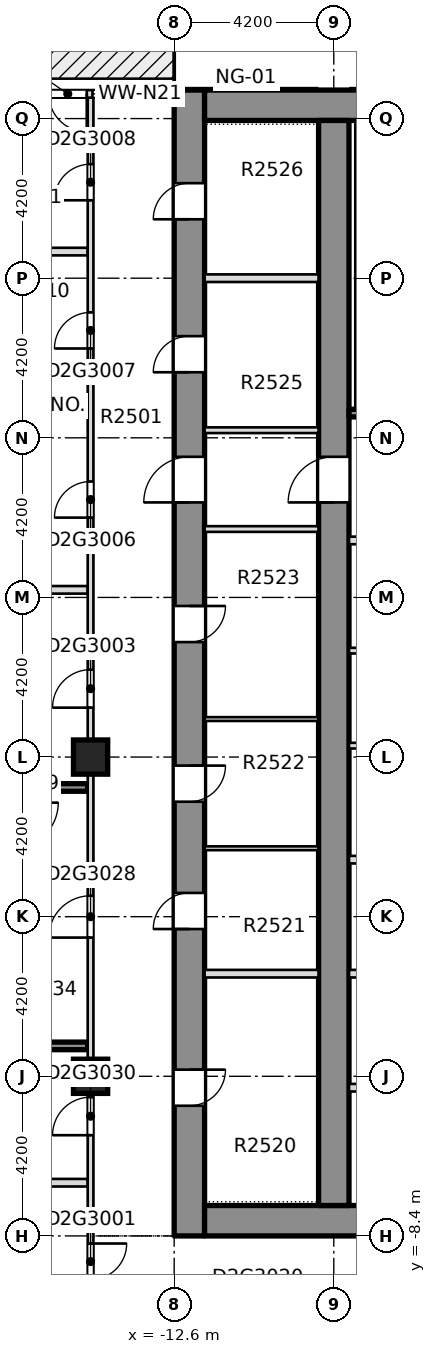
"""IFC4 building model, lengths in metres.
Left out: names, types, materials, properties, quantities, classifications, styles, units other than length and angle.
Written with IfcOpenShell. Run it as: python <this file> out.ifc"""

import sys

from ifc_helpers import new_model, si_unit, direction, frame, frame_2d, origin, origin_2d, place, context, subcontext, project, spatial, rectangle, extrude, element, fill, save


model = new_model("IFC4")
c1 = context("Model", 3, precision=1e-05, world=origin(), true_north=direction((0.0, 1.0)))
c2 = subcontext(c1, "Body", "Model", "MODEL_VIEW")
j1 = project(units=[si_unit("LENGTHUNIT", "METRE"), si_unit("PLANEANGLEUNIT", "RADIAN")], contexts=[c1])
p1 = place(None, origin())
s1 = spatial("IfcSite", under=j1, at=p1, CompositionType="ELEMENT")
p2 = place(p1, origin())
s2 = spatial("IfcBuilding", under=s1, at=p2, CompositionType="ELEMENT")
p3 = place(p2, frame((0.0, 0.0, 101.1)))
s3 = spatial("IfcBuildingStorey", under=s2, at=p3, CompositionType="ELEMENT", Elevation=101.1)
p4 = place(p3, frame((-12.2, -8.4, -0.32), z_axis=(0.0, 0.0, 1.0), x_axis=(0.0, 1.0, 0.0)))
e1 = element("IfcWall", 1, at=p4, inside=s3, PredefinedType="SHEAR", context=c2, shape_type="SweptSolid", body=[
    extrude(rectangle(XDim=30.15, YDim=0.8, at=frame_2d((15.075, 0.0))), origin(), (0.0, 0.0, 1.0), 3.45),
])
p5 = place(p4, frame((3.425, 0.0, 0.32)))
e2 = element("IfcOpeningElement", 2, at=p5, cuts=e1, PredefinedType="OPENING", context=c2, shape_type="SweptSolid", body=[
    extrude(rectangle(XDim=0.95, YDim=2.1, at=frame_2d((0.475, 1.05))), frame((0.0, 0.41, 0.0), z_axis=(0.0, -1.0, 0.0), x_axis=(1.0, 0.0, 0.0)), (0.0, 0.0, 1.0), 0.82),
])
p6 = place(p4, frame((8.075, 0.0, 0.32)))
e3 = element("IfcOpeningElement", 3, at=p6, cuts=e1, PredefinedType="OPENING", context=c2, shape_type="SweptSolid", body=[
    extrude(rectangle(XDim=0.95, YDim=2.1, at=frame_2d((0.475, 1.05))), frame((0.0, 0.41, 0.0), z_axis=(0.0, -1.0, 0.0), x_axis=(1.0, 0.0, 0.0)), (0.0, 0.0, 1.0), 0.82),
])
p7 = place(p4, frame((11.425, 0.0, 0.32)))
e4 = element("IfcOpeningElement", 4, at=p7, cuts=e1, PredefinedType="OPENING", context=c2, shape_type="SweptSolid", body=[
    extrude(rectangle(XDim=0.95, YDim=2.1, at=frame_2d((0.475, 1.05))), frame((0.0, 0.41, 0.0), z_axis=(0.0, -1.0, 0.0), x_axis=(1.0, 0.0, 0.0)), (0.0, 0.0, 1.0), 0.82),
])
p8 = place(p4, frame((15.625, 0.0, 0.32)))
e5 = element("IfcOpeningElement", 5, at=p8, cuts=e1, PredefinedType="OPENING", context=c2, shape_type="SweptSolid", body=[
    extrude(rectangle(XDim=0.95, YDim=2.1, at=frame_2d((0.475, 1.05))), frame((0.0, 0.41, 0.0), z_axis=(0.0, -1.0, 0.0), x_axis=(1.0, 0.0, 0.0)), (0.0, 0.0, 1.0), 0.82),
])
p9 = place(p4, frame((22.725, 0.0, 0.32)))
e6 = element("IfcOpeningElement", 6, at=p9, cuts=e1, PredefinedType="OPENING", context=c2, shape_type="SweptSolid", body=[
    extrude(rectangle(XDim=0.95, YDim=2.1, at=frame_2d((0.475, 1.05))), frame((0.0, 0.41, 0.0), z_axis=(0.0, -1.0, 0.0), x_axis=(1.0, 0.0, 0.0)), (0.0, 0.0, 1.0), 0.82),
])
p10 = place(p4, frame((26.75, 0.0, 0.32)))
e7 = element("IfcOpeningElement", 7, at=p10, cuts=e1, PredefinedType="OPENING", context=c2, shape_type="SweptSolid", body=[
    extrude(rectangle(XDim=0.95, YDim=2.1, at=frame_2d((0.475, 1.05))), frame((0.0, 0.41, 0.0), z_axis=(0.0, -1.0, 0.0), x_axis=(1.0, 0.0, 0.0)), (0.0, 0.0, 1.0), 0.82),
])
p11 = place(p4, frame((19.3, 0.0, 0.32)))
e8 = element("IfcOpeningElement", 8, at=p11, cuts=e1, PredefinedType="OPENING", context=c2, shape_type="SweptSolid", body=[
    extrude(rectangle(XDim=1.2, YDim=2.1, at=frame_2d((0.6, 1.05))), frame((0.0, 0.41, 0.0), z_axis=(0.0, -1.0, 0.0), x_axis=(1.0, 0.0, 0.0)), (0.0, 0.0, 1.0), 0.82),
])
p12 = place(p3, frame((-11.8, -8.0, -0.32), z_axis=(0.0, 0.0, 1.0), x_axis=(1.0, 0.0, 0.0)))
e9 = element("IfcWall", 9, at=p12, inside=s3, PredefinedType="SHEAR", context=c2, shape_type="SweptSolid", body=[
    extrude(rectangle(XDim=23.6, YDim=0.8, at=frame_2d((11.8, 0.0))), origin(), (0.0, 0.0, 1.0), 3.45),
])
p13 = place(p12, frame((7.05, 0.0, 0.32)))
e10 = element("IfcOpeningElement", 10, at=p13, cuts=e9, PredefinedType="OPENING", context=c2, shape_type="SweptSolid", body=[
    extrude(rectangle(XDim=1.8, YDim=2.1, at=frame_2d((0.9, 1.05))), frame((0.0, 0.41, 0.0), z_axis=(0.0, -1.0, 0.0), x_axis=(1.0, 0.0, 0.0)), (0.0, 0.0, 1.0), 0.82),
])
p14 = place(p12, frame((14.75, 0.0, 0.32)))
e11 = element("IfcOpeningElement", 11, at=p14, cuts=e9, PredefinedType="OPENING", context=c2, shape_type="SweptSolid", body=[
    extrude(rectangle(XDim=1.8, YDim=2.1, at=frame_2d((0.9, 1.05))), frame((0.0, 0.41, 0.0), z_axis=(0.0, -1.0, 0.0), x_axis=(1.0, 0.0, 0.0)), (0.0, 0.0, 1.0), 0.82),
])
p15 = place(p3, frame((-11.8, 21.35, -0.32), z_axis=(0.0, 0.0, 1.0), x_axis=(1.0, 0.0, 0.0)))
e12 = element("IfcWall", 12, at=p15, inside=s3, PredefinedType="SHEAR", context=c2, shape_type="SweptSolid", body=[
    extrude(rectangle(XDim=23.6, YDim=0.8, at=frame_2d((11.8, 0.0))), origin(), (0.0, 0.0, 1.0), 3.45),
])
p16 = place(p3, frame((-8.4, -7.6, -0.32), z_axis=(0.0, 0.0, 1.0), x_axis=(0.0, 1.0, 0.0)))
e13 = element("IfcWall", 13, at=p16, inside=s3, PredefinedType="SHEAR", context=c2, shape_type="SweptSolid", body=[
    extrude(rectangle(XDim=28.55, YDim=0.8, at=frame_2d((14.275, 0.0))), origin(), (0.0, 0.0, 1.0), 3.45),
])
p17 = place(p16, frame((18.5, 0.0, 0.32)))
e14 = element("IfcOpeningElement", 14, at=p17, cuts=e13, PredefinedType="OPENING", context=c2, shape_type="SweptSolid", body=[
    extrude(rectangle(XDim=1.2, YDim=2.1, at=frame_2d((0.6, 1.05))), frame((0.0, 0.41, 0.0), z_axis=(0.0, -1.0, 0.0), x_axis=(1.0, 0.0, 0.0)), (0.0, 0.0, 1.0), 0.82),
])
for number, where, z_axis, x_axis in (
    (15, (-14.8, -4.2, -0.32), (0.0, 0.0, 1.0), (1.0, 0.0, 0.0)),
    (16, (-14.8, 4.2, -0.32), (0.0, 0.0, 1.0), (1.0, 0.0, 0.0)),
):
    element("IfcColumn", number, at=place(p3, frame(where, z_axis=z_axis, x_axis=x_axis)), inside=s3, PredefinedType="COLUMN", context=c2, shape_type="SweptSolid", body=[
        extrude(rectangle(XDim=0.9, YDim=0.9, at=origin_2d()), origin(), (0.0, 0.0, 1.0), 3.45),
    ])
p18 = place(p3, frame((-25.75, -7.0, 0.0), z_axis=(0.0, 0.0, 1.0), x_axis=(1.0, 0.0, 0.0)))
e17 = element("IfcWall", 17, at=p18, inside=s3, PredefinedType="PARTITIONING", context=c2, shape_type="SweptSolid", body=[
    extrude(rectangle(XDim=10.875, YDim=0.2, at=frame_2d((5.438, 0.0))), origin(), (0.0, 0.0, 1.0), 3.13),
])
p19 = place(p3, frame((-20.45, 3.4, 0.0), z_axis=(0.0, 0.0, 1.0), x_axis=(1.0, 0.0, 0.0)))
e18 = element("IfcWall", 18, at=p19, inside=s3, PredefinedType="SOLIDWALL", context=c2, shape_type="SweptSolid", body=[
    extrude(rectangle(XDim=5.575, YDim=0.2, at=frame_2d((2.788, 0.0))), origin(), (0.0, 0.0, 1.0), 3.13),
])
p20 = place(p3, frame((-25.75, 8.6, 0.0), z_axis=(0.0, 0.0, 1.0), x_axis=(1.0, 0.0, 0.0)))
e19 = element("IfcWall", 19, at=p20, inside=s3, PredefinedType="PARTITIONING", context=c2, shape_type="SweptSolid", body=[
    extrude(rectangle(XDim=10.875, YDim=0.2, at=frame_2d((5.438, 0.0))), origin(), (0.0, 0.0, 1.0), 3.13),
])
for number, where, z_axis, x_axis in (
    (20, (-17.35, 13.35, 0.0), (0.0, 0.0, 1.0), (1.0, 0.0, 0.0)),
    (21, (-17.35, 17.5, 0.0), (0.0, 0.0, 1.0), (1.0, 0.0, 0.0)),
):
    element("IfcWall", number, at=place(p3, frame(where, z_axis=z_axis, x_axis=x_axis)), inside=s3, PredefinedType="PARTITIONING", context=c2, shape_type="SweptSolid", body=[
        extrude(rectangle(XDim=2.475, YDim=0.2, at=frame_2d((1.238, 0.0))), origin(), (0.0, 0.0, 1.0), 3.13),
    ])
p21 = place(p3, frame((-14.8, -10.6, 0.0), z_axis=(0.0, 0.0, 1.0), x_axis=(0.0, 1.0, 0.0)))
e22 = element("IfcWall", 22, at=p21, inside=s3, PredefinedType="PARTITIONING", context=c2, shape_type="SweptSolid", body=[
    extrude(rectangle(XDim=32.15, YDim=0.15, at=frame_2d((16.075, 0.0))), origin(), (0.0, 0.0, 1.0), 3.13),
])
p22 = place(p21, frame((1.05, 0.0, 0.0)))
e23 = element("IfcOpeningElement", 23, at=p22, cuts=e22, PredefinedType="OPENING", context=c2, shape_type="SweptSolid", body=[
    extrude(rectangle(XDim=0.95, YDim=2.1, at=frame_2d((0.475, 1.05))), frame((0.0, 0.085, 0.0), z_axis=(0.0, -1.0, 0.0), x_axis=(1.0, 0.0, 0.0)), (0.0, 0.0, 1.0), 0.17),
])
p23 = place(p21, frame((16.1, 0.0, 0.0)))
e24 = element("IfcOpeningElement", 24, at=p23, cuts=e22, PredefinedType="OPENING", context=c2, shape_type="SweptSolid", body=[
    extrude(rectangle(XDim=1.0, YDim=2.1, at=frame_2d((0.5, 1.05))), frame((0.0, 0.085, 0.0), z_axis=(0.0, -1.0, 0.0), x_axis=(1.0, 0.0, 0.0)), (0.0, 0.0, 1.0), 0.17),
])
p24 = place(p21, frame((21.1, 0.0, 0.0)))
e25 = element("IfcOpeningElement", 25, at=p24, cuts=e22, PredefinedType="OPENING", context=c2, shape_type="SweptSolid", body=[
    extrude(rectangle(XDim=0.95, YDim=2.1, at=frame_2d((0.475, 1.05))), frame((0.0, 0.085, 0.0), z_axis=(0.0, -1.0, 0.0), x_axis=(1.0, 0.0, 0.0)), (0.0, 0.0, 1.0), 0.17),
])
p25 = place(p21, frame((25.55, 0.0, 0.0)))
e26 = element("IfcOpeningElement", 26, at=p25, cuts=e22, PredefinedType="OPENING", context=c2, shape_type="SweptSolid", body=[
    extrude(rectangle(XDim=0.95, YDim=2.1, at=frame_2d((0.475, 1.05))), frame((0.0, 0.085, 0.0), z_axis=(0.0, -1.0, 0.0), x_axis=(1.0, 0.0, 0.0)), (0.0, 0.0, 1.0), 0.17),
])
p26 = place(p21, frame((29.45, 0.0, 0.0)))
e27 = element("IfcOpeningElement", 27, at=p26, cuts=e22, PredefinedType="OPENING", context=c2, shape_type="SweptSolid", body=[
    extrude(rectangle(XDim=0.95, YDim=2.1, at=frame_2d((0.475, 1.05))), frame((0.0, 0.085, 0.0), z_axis=(0.0, -1.0, 0.0), x_axis=(1.0, 0.0, 0.0)), (0.0, 0.0, 1.0), 0.17),
])
p27 = place(p21, frame((10.05, 0.0, 0.0)))
e28 = element("IfcOpeningElement", 28, at=p27, cuts=e22, PredefinedType="OPENING", context=c2, shape_type="SweptSolid", body=[
    extrude(rectangle(XDim=1.1, YDim=2.1, at=frame_2d((0.55, 1.05))), frame((0.0, 0.085, 0.0), z_axis=(0.0, -1.0, 0.0), x_axis=(1.0, 0.0, 0.0)), (0.0, 0.0, 1.0), 0.17),
])
p28 = place(p21, frame((4.85, 0.0, 0.0)))
e29 = element("IfcOpeningElement", 29, at=p28, cuts=e22, PredefinedType="OPENING", context=c2, shape_type="SweptSolid", body=[
    extrude(rectangle(XDim=1.0, YDim=2.1, at=frame_2d((0.5, 1.05))), frame((0.0, 0.085, 0.0), z_axis=(0.0, -1.0, 0.0), x_axis=(1.0, 0.0, 0.0)), (0.0, 0.0, 1.0), 0.17),
])
p29 = place(p3, frame((-12.6, 21.65, 0.0), z_axis=(0.0, 0.0, 1.0), x_axis=(-1.0, 0.0, 0.0)))
e30 = element("IfcWall", 30, at=p29, inside=s3, PredefinedType="STANDARD", context=c2, shape_type="SweptSolid", body=[
    extrude(rectangle(XDim=3.6, YDim=0.2, at=frame_2d((1.8, 0.0))), origin(), (0.0, 0.0, 1.0), 3.13),
])
p30 = place(p29, frame((0.35, 0.0, 0.2)))
e31 = element("IfcOpeningElement", 31, at=p30, cuts=e30, PredefinedType="OPENING", context=c2, shape_type="SweptSolid", body=[
    extrude(rectangle(XDim=1.8, YDim=2.65, at=frame_2d((0.9, 1.325))), frame((0.0, 0.11, 0.0), z_axis=(0.0, -1.0, 0.0), x_axis=(1.0, 0.0, 0.0)), (0.0, 0.0, 1.0), 0.22),
])
p31 = place(p29, frame((2.3, 0.0, 0.0)))
e32 = element("IfcOpeningElement", 32, at=p31, cuts=e30, PredefinedType="OPENING", context=c2, shape_type="SweptSolid", body=[
    extrude(rectangle(XDim=1.0, YDim=2.4, at=frame_2d((0.5, 1.2))), frame((0.0, 0.11, 0.0), z_axis=(0.0, -1.0, 0.0), x_axis=(1.0, 0.0, 0.0)), (0.0, 0.0, 1.0), 0.22),
])
for number, where, z_axis, x_axis in (
    (33, (-7.999, -4.5, 0.0), (0.0, 0.0, 1.0), (1.0, 0.0, 0.0)),
    (34, (-7.999, -1.5, 0.0), (0.0, 0.0, 1.0), (1.0, 0.0, 0.0)),
    (35, (-7.999, 1.5, 0.0), (0.0, 0.0, 1.0), (1.0, 0.0, 0.0)),
):
    element("IfcWall", number, at=place(p3, frame(where, z_axis=z_axis, x_axis=x_axis)), inside=s3, PredefinedType="PARTITIONING", context=c2, shape_type="SweptSolid", body=[
        extrude(rectangle(XDim=2.424, YDim=0.2, at=frame_2d((1.212, 0.0))), origin(), (0.0, 0.0, 1.0), 3.13),
    ])
p32 = place(p3, frame((-7.999, 4.5, 0.0), z_axis=(0.0, 0.0, 1.0), x_axis=(1.0, 0.0, 0.0)))
e36 = element("IfcWall", 36, at=p32, inside=s3, PredefinedType="PARTITIONING", context=c2, shape_type="SweptSolid", body=[
    extrude(rectangle(XDim=2.574, YDim=0.15, at=frame_2d((1.287, 0.0))), origin(), (0.0, 0.0, 1.0), 3.13),
])
p33 = place(p3, frame((-7.999, 7.0, 0.0), z_axis=(0.0, 0.0, 1.0), x_axis=(1.0, 0.0, 0.0)))
e37 = element("IfcWall", 37, at=p33, inside=s3, PredefinedType="PARTITIONING", context=c2, shape_type="SweptSolid", body=[
    extrude(rectangle(XDim=15.998, YDim=0.15, at=frame_2d((7.999, 0.0))), origin(), (0.0, 0.0, 1.0), 3.13),
])
p34 = place(p33, frame((7.299, 0.0, 0.0)))
e38 = element("IfcOpeningElement", 38, at=p34, cuts=e37, PredefinedType="OPENING", context=c2, shape_type="SweptSolid", body=[
    extrude(rectangle(XDim=1.4, YDim=2.1, at=frame_2d((0.7, 1.05))), frame((0.0, 0.085, 0.0), z_axis=(0.0, -1.0, 0.0), x_axis=(1.0, 0.0, 0.0)), (0.0, 0.0, 1.0), 0.17),
])
p35 = place(p3, frame((-7.999, 9.9, 0.0), z_axis=(0.0, 0.0, 1.0), x_axis=(1.0, 0.0, 0.0)))
e39 = element("IfcWall", 39, at=p35, inside=s3, PredefinedType="PARTITIONING", context=c2, shape_type="SweptSolid", body=[
    extrude(rectangle(XDim=4.399, YDim=0.2, at=frame_2d((2.199, 0.0))), origin(), (0.0, 0.0, 1.0), 3.13),
])
p36 = place(p35, frame((1.049, 0.0, 0.0)))
e40 = element("IfcOpeningElement", 40, at=p36, cuts=e39, PredefinedType="OPENING", context=c2, shape_type="SweptSolid", body=[
    extrude(rectangle(XDim=1.1, YDim=2.1, at=frame_2d((0.55, 1.05))), frame((0.0, 0.11, 0.0), z_axis=(0.0, -1.0, 0.0), x_axis=(1.0, 0.0, 0.0)), (0.0, 0.0, 1.0), 0.22),
])
p37 = place(p3, frame((-7.999, 13.25, 0.0), z_axis=(0.0, 0.0, 1.0), x_axis=(1.0, 0.0, 0.0)))
e41 = element("IfcWall", 41, at=p37, inside=s3, PredefinedType="SOLIDWALL", context=c2, shape_type="SweptSolid", body=[
    extrude(rectangle(XDim=4.574, YDim=0.2, at=frame_2d((2.287, 0.0))), origin(), (0.0, 0.0, 1.0), 3.13),
])
p38 = place(p37, frame((1.549, 0.0, 0.0)))
e42 = element("IfcOpeningElement", 42, at=p38, cuts=e41, PredefinedType="OPENING", context=c2, shape_type="SweptSolid", body=[
    extrude(rectangle(XDim=1.2, YDim=2.1, at=frame_2d((0.6, 1.05))), frame((0.0, 0.11, 0.0), z_axis=(0.0, -1.0, 0.0), x_axis=(1.0, 0.0, 0.0)), (0.0, 0.0, 1.0), 0.22),
])
p39 = place(p3, frame((-11.799, -1.5, 0.0), z_axis=(0.0, 0.0, 1.0), x_axis=(1.0, 0.0, 0.0)))
e43 = element("IfcWall", 43, at=p39, inside=s3, PredefinedType="PARTITIONING", context=c2, shape_type="SweptSolid", body=[
    extrude(rectangle(XDim=2.998, YDim=0.2, at=frame_2d((1.499, 0.0))), origin(), (0.0, 0.0, 1.0), 3.13),
])
for number, where, z_axis, x_axis in (
    (44, (-11.799, 1.8, 0.0), (0.0, 0.0, 1.0), (1.0, 0.0, 0.0)),
    (45, (-11.799, 5.2, 0.0), (0.0, 0.0, 1.0), (1.0, 0.0, 0.0)),
):
    element("IfcWall", number, at=place(p3, frame(where, z_axis=z_axis, x_axis=x_axis)), inside=s3, PredefinedType="PARTITIONING", context=c2, shape_type="SweptSolid", body=[
        extrude(rectangle(XDim=2.998, YDim=0.1, at=frame_2d((1.499, 0.0))), origin(), (0.0, 0.0, 1.0), 3.13),
    ])
for number, where, z_axis, x_axis in (
    (46, (-11.799, 10.2, 0.0), (0.0, 0.0, 1.0), (1.0, 0.0, 0.0)),
    (47, (-11.799, 12.8, 0.0), (0.0, 0.0, 1.0), (1.0, 0.0, 0.0)),
):
    element("IfcWall", number, at=place(p3, frame(where, z_axis=z_axis, x_axis=x_axis)), inside=s3, PredefinedType="PARTITIONING", context=c2, shape_type="SweptSolid", body=[
        extrude(rectangle(XDim=2.998, YDim=0.15, at=frame_2d((1.499, 0.0))), origin(), (0.0, 0.0, 1.0), 3.13),
    ])
p40 = place(p3, frame((-11.799, 16.8, 0.0), z_axis=(0.0, 0.0, 1.0), x_axis=(1.0, 0.0, 0.0)))
e48 = element("IfcWall", 48, at=p40, inside=s3, PredefinedType="PARTITIONING", context=c2, shape_type="SweptSolid", body=[
    extrude(rectangle(XDim=2.998, YDim=0.2, at=frame_2d((1.499, 0.0))), origin(), (0.0, 0.0, 1.0), 3.13),
])
p41 = place(p3, frame((-23.0, -3.4, 0.0), z_axis=(0.0, 0.0, 1.0), x_axis=(1.0, 0.0, 0.0)))
e49 = element("IfcWall", 49, at=p41, inside=s3, PredefinedType="SOLIDWALL", context=c2, shape_type="SweptSolid", body=[
    extrude(rectangle(XDim=8.123, YDim=0.2, at=frame_2d((4.062, 0.0))), origin(), (0.0, 0.0, 1.0), 3.13),
])
p42 = place(p22, origin())
e50 = element("IfcDoor", 50, at=p42, inside=s3, OperationType="SINGLE_SWING_LEFT", PredefinedType="DOOR", context=c2, shape_type="SweptSolid", body=[
    extrude(rectangle(XDim=0.95, YDim=2.1, at=frame_2d((0.475, 1.05))), frame((0.0, 0.025, 0.0), z_axis=(0.0, -1.0, 0.0), x_axis=(1.0, 0.0, 0.0)), (0.0, 0.0, 1.0), 0.05),
])
fill(e23, e50)
p43 = place(p23, origin())
e51 = element("IfcDoor", 51, at=p43, inside=s3, OperationType="SINGLE_SWING_LEFT", PredefinedType="DOOR", context=c2, shape_type="SweptSolid", body=[
    extrude(rectangle(XDim=1.0, YDim=2.1, at=frame_2d((0.5, 1.05))), frame((0.0, 0.025, 0.0), z_axis=(0.0, -1.0, 0.0), x_axis=(1.0, 0.0, 0.0)), (0.0, 0.0, 1.0), 0.05),
])
fill(e24, e51)
p44 = place(p24, origin())
e52 = element("IfcDoor", 52, at=p44, inside=s3, OperationType="SINGLE_SWING_RIGHT", PredefinedType="DOOR", context=c2, shape_type="SweptSolid", body=[
    extrude(rectangle(XDim=0.95, YDim=2.1, at=frame_2d((0.475, 1.05))), frame((0.0, 0.025, 0.0), z_axis=(0.0, -1.0, 0.0), x_axis=(1.0, 0.0, 0.0)), (0.0, 0.0, 1.0), 0.05),
])
fill(e25, e52)
p45 = place(p25, origin())
e53 = element("IfcDoor", 53, at=p45, inside=s3, OperationType="SINGLE_SWING_LEFT", PredefinedType="DOOR", context=c2, shape_type="SweptSolid", body=[
    extrude(rectangle(XDim=0.95, YDim=2.1, at=frame_2d((0.475, 1.05))), frame((0.0, 0.025, 0.0), z_axis=(0.0, -1.0, 0.0), x_axis=(1.0, 0.0, 0.0)), (0.0, 0.0, 1.0), 0.05),
])
fill(e26, e53)
p46 = place(p26, origin())
e54 = element("IfcDoor", 54, at=p46, inside=s3, OperationType="SINGLE_SWING_RIGHT", PredefinedType="DOOR", context=c2, shape_type="SweptSolid", body=[
    extrude(rectangle(XDim=0.95, YDim=2.1, at=frame_2d((0.475, 1.05))), frame((0.0, 0.025, 0.0), z_axis=(0.0, -1.0, 0.0), x_axis=(1.0, 0.0, 0.0)), (0.0, 0.0, 1.0), 0.05),
])
fill(e27, e54)
p47 = place(p27, origin())
e55 = element("IfcDoor", 55, at=p47, inside=s3, OperationType="SINGLE_SWING_RIGHT", PredefinedType="DOOR", context=c2, shape_type="SweptSolid", body=[
    extrude(rectangle(XDim=1.1, YDim=2.1, at=frame_2d((0.55, 1.05))), frame((0.0, 0.025, 0.0), z_axis=(0.0, -1.0, 0.0), x_axis=(1.0, 0.0, 0.0)), (0.0, 0.0, 1.0), 0.05),
])
fill(e28, e55)
p48 = place(p28, origin())
e56 = element("IfcDoor", 56, at=p48, inside=s3, OperationType="SINGLE_SWING_RIGHT", PredefinedType="DOOR", context=c2, shape_type="SweptSolid", body=[
    extrude(rectangle(XDim=1.0, YDim=2.1, at=frame_2d((0.5, 1.05))), frame((0.0, 0.025, 0.0), z_axis=(0.0, -1.0, 0.0), x_axis=(1.0, 0.0, 0.0)), (0.0, 0.0, 1.0), 0.05),
])
fill(e29, e56)
p49 = place(p30, origin())
e57 = element("IfcWindow", 57, at=p49, inside=s3, PartitioningType="SINGLE_PANEL", PredefinedType="WINDOW", context=c2, shape_type="SweptSolid", body=[
    extrude(rectangle(XDim=1.8, YDim=2.65, at=frame_2d((0.9, 1.325))), frame((0.0, 0.03, 0.0), z_axis=(0.0, -1.0, 0.0), x_axis=(1.0, 0.0, 0.0)), (0.0, 0.0, 1.0), 0.06),
])
fill(e31, e57)
p50 = place(p31, origin())
e58 = element("IfcDoor", 58, at=p50, inside=s3, OperationType="SINGLE_SWING_LEFT", PredefinedType="DOOR", context=c2, shape_type="SweptSolid", body=[
    extrude(rectangle(XDim=1.0, YDim=2.4, at=frame_2d((0.5, 1.2))), frame((0.0, 0.025, 0.0), z_axis=(0.0, -1.0, 0.0), x_axis=(1.0, 0.0, 0.0)), (0.0, 0.0, 1.0), 0.05),
])
fill(e32, e58)
p51 = place(p5, origin())
e59 = element("IfcDoor", 59, at=p51, inside=s3, OperationType="SINGLE_SWING_LEFT", PredefinedType="DOOR", context=c2, shape_type="SweptSolid", body=[
    extrude(rectangle(XDim=0.95, YDim=2.1, at=frame_2d((0.475, 1.05))), frame((0.0, 0.025, 0.0), z_axis=(0.0, -1.0, 0.0), x_axis=(1.0, 0.0, 0.0)), (0.0, 0.0, 1.0), 0.05),
])
fill(e2, e59)
p52 = place(p6, origin())
e60 = element("IfcDoor", 60, at=p52, inside=s3, OperationType="SINGLE_SWING_LEFT", PredefinedType="DOOR", context=c2, shape_type="SweptSolid", body=[
    extrude(rectangle(XDim=0.95, YDim=2.1, at=frame_2d((0.475, 1.05))), frame((0.0, 0.025, 0.0), z_axis=(0.0, -1.0, 0.0), x_axis=(1.0, 0.0, 0.0)), (0.0, 0.0, 1.0), 0.05),
])
fill(e3, e60)
p53 = place(p7, origin())
e61 = element("IfcDoor", 61, at=p53, inside=s3, OperationType="SINGLE_SWING_LEFT", PredefinedType="DOOR", context=c2, shape_type="SweptSolid", body=[
    extrude(rectangle(XDim=0.95, YDim=2.1, at=frame_2d((0.475, 1.05))), frame((0.0, 0.025, 0.0), z_axis=(0.0, -1.0, 0.0), x_axis=(1.0, 0.0, 0.0)), (0.0, 0.0, 1.0), 0.05),
])
fill(e4, e61)
p54 = place(p8, origin())
e62 = element("IfcDoor", 62, at=p54, inside=s3, OperationType="SINGLE_SWING_LEFT", PredefinedType="DOOR", context=c2, shape_type="SweptSolid", body=[
    extrude(rectangle(XDim=0.95, YDim=2.1, at=frame_2d((0.475, 1.05))), frame((0.0, 0.025, 0.0), z_axis=(0.0, -1.0, 0.0), x_axis=(1.0, 0.0, 0.0)), (0.0, 0.0, 1.0), 0.05),
])
fill(e5, e62)
p55 = place(p9, origin())
e63 = element("IfcDoor", 63, at=p55, inside=s3, OperationType="SINGLE_SWING_LEFT", PredefinedType="DOOR", context=c2, shape_type="SweptSolid", body=[
    extrude(rectangle(XDim=0.95, YDim=2.1, at=frame_2d((0.475, 1.05))), frame((0.0, 0.025, 0.0), z_axis=(0.0, -1.0, 0.0), x_axis=(1.0, 0.0, 0.0)), (0.0, 0.0, 1.0), 0.05),
])
fill(e6, e63)
p56 = place(p10, origin())
e64 = element("IfcDoor", 64, at=p56, inside=s3, OperationType="SINGLE_SWING_LEFT", PredefinedType="DOOR", context=c2, shape_type="SweptSolid", body=[
    extrude(rectangle(XDim=0.95, YDim=2.1, at=frame_2d((0.475, 1.05))), frame((0.0, 0.025, 0.0), z_axis=(0.0, -1.0, 0.0), x_axis=(1.0, 0.0, 0.0)), (0.0, 0.0, 1.0), 0.05),
])
fill(e7, e64)
p57 = place(p11, origin())
e65 = element("IfcDoor", 65, at=p57, inside=s3, OperationType="SINGLE_SWING_LEFT", PredefinedType="DOOR", context=c2, shape_type="SweptSolid", body=[
    extrude(rectangle(XDim=1.2, YDim=2.1, at=frame_2d((0.6, 1.05))), frame((0.0, 0.025, 0.0), z_axis=(0.0, -1.0, 0.0), x_axis=(1.0, 0.0, 0.0)), (0.0, 0.0, 1.0), 0.05),
])
fill(e8, e65)
p58 = place(p17, origin())
e66 = element("IfcDoor", 66, at=p58, inside=s3, OperationType="SINGLE_SWING_LEFT", PredefinedType="DOOR", context=c2, shape_type="SweptSolid", body=[
    extrude(rectangle(XDim=1.2, YDim=2.1, at=frame_2d((0.6, 1.05))), frame((0.0, 0.025, 0.0), z_axis=(0.0, -1.0, 0.0), x_axis=(1.0, 0.0, 0.0)), (0.0, 0.0, 1.0), 0.05),
])
fill(e14, e66)
save(model, sys.argv[1])
